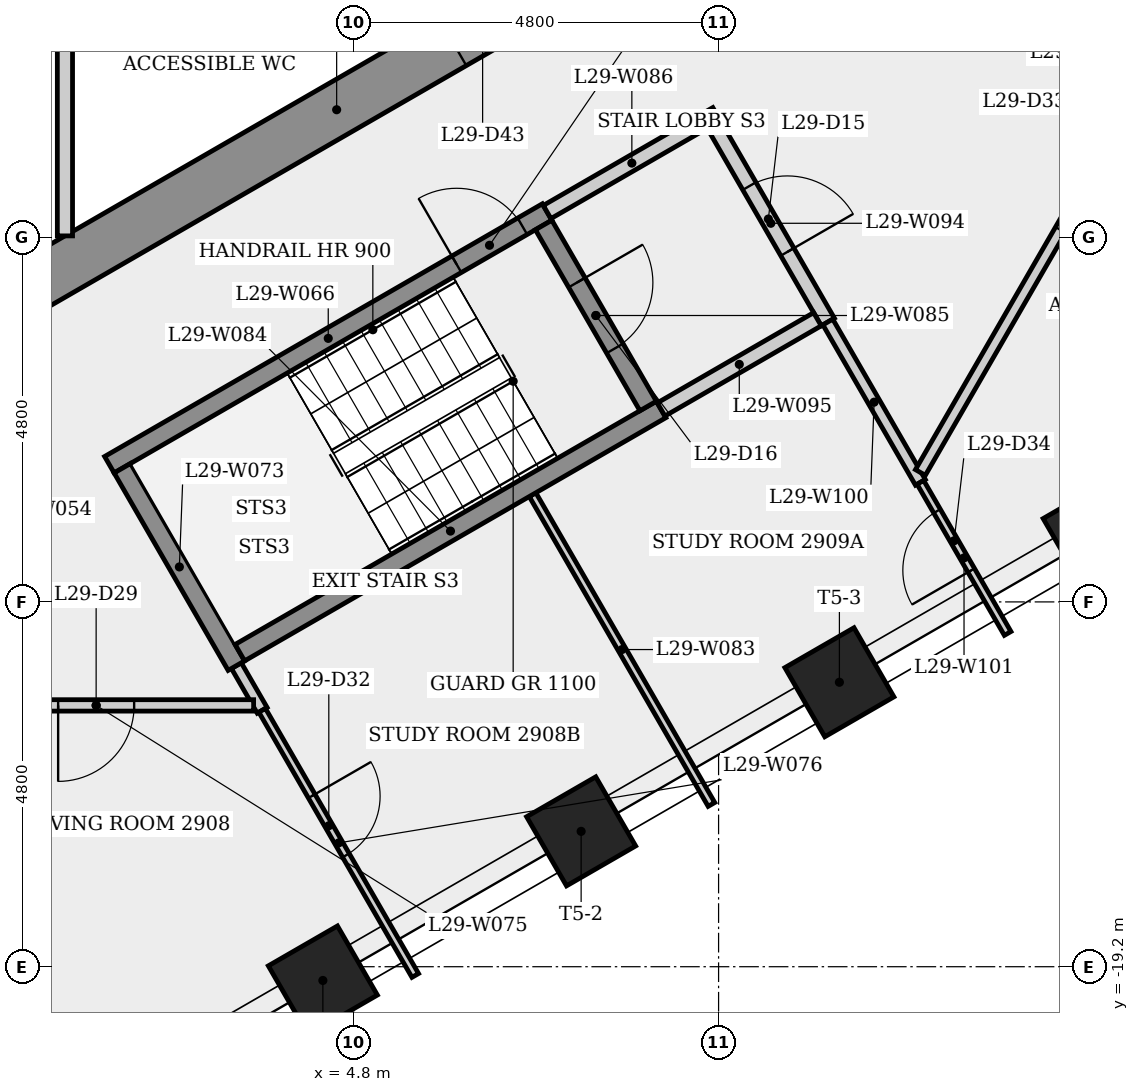
"""IFC4 building model, lengths in metres.
Left out: names, types, materials, properties, quantities, classifications, styles, units other than length and angle.
Written with IfcOpenShell. Run it as: python <this file> out.ifc"""

import sys

from ifc_helpers import new_model, si_unit, direction, frame, frame_2d, origin, origin_2d, place, context, subcontext, project, spatial, rectangle, extrude, element, fill, save


model = new_model("IFC4")
c1 = context("Model", 3, precision=1e-05, world=origin(), true_north=direction((0.0, 1.0)))
c2 = subcontext(c1, "Body", "Model", "MODEL_VIEW")
j1 = project(units=[si_unit("LENGTHUNIT", "METRE"), si_unit("PLANEANGLEUNIT", "RADIAN")], contexts=[c1])
p1 = place(None, origin())
s1 = spatial("IfcSite", under=j1, at=p1, CompositionType="ELEMENT")
p2 = place(p1, origin())
s2 = spatial("IfcBuilding", under=s1, at=p2, CompositionType="ELEMENT")
p3 = place(p2, frame((0.0, 0.0, 110.3)))
s3 = spatial("IfcBuildingStorey", under=s2, at=p3, CompositionType="ELEMENT", Elevation=110.3)
p4 = place(p3, frame((-0.175, -10.667, 0.0), z_axis=(0.0, 0.0, 1.0), x_axis=(0.866023993627, 0.500002442456, 0.0)))
e1 = element("IfcWall", 1, at=p4, inside=s3, PredefinedType="SHEAR", context=c2, shape_type="SweptSolid", body=[
    extrude(rectangle(XDim=10.97, YDim=0.7, at=frame_2d((5.485, 0.0))), origin(), (0.0, 0.0, 1.0), 3.4),
])
p5 = place(p4, frame((7.252, 0.0, 0.0)))
e2 = element("IfcOpeningElement", 2, at=p5, cuts=e1, PredefinedType="OPENING", context=c2, shape_type="SweptSolid", body=[
    extrude(rectangle(XDim=0.9, YDim=2.1, at=frame_2d((0.45, 1.05))), frame((0.0, 0.36, 0.0), z_axis=(0.0, -1.0, 0.0), x_axis=(1.0, 0.0, 0.0)), (0.0, 0.0, 1.0), 0.72),
])
for number, where, z_axis, x_axis in (
    (3, (4.394, -19.381, 0.0), (0.0, 0.0, 1.0), (0.5, -0.866, 0.0)),
    (4, (7.792, -17.419, 0.0), (0.0, 0.0, 1.0), (0.5, -0.866, 0.0)),
    (5, (11.189, -15.457, 0.0), (0.0, 0.0, 1.0), (0.5, -0.866, 0.0)),
    (6, (14.588, -13.495, 0.0), (0.0, 0.0, 1.0), (0.5, -0.866, 0.0)),
):
    element("IfcColumn", number, at=place(p3, frame(where, z_axis=z_axis, x_axis=x_axis)), inside=s3, PredefinedType="COLUMN", context=c2, shape_type="SweptSolid", body=[
        extrude(rectangle(XDim=1.05, YDim=1.05, at=origin_2d()), origin(), (0.0, 0.0, 1.0), 3.4),
    ])
p6 = place(p3, frame((1.0, -5.275, 0.0), z_axis=(0.0, 0.0, 1.0), x_axis=(0.0, -1.0, 0.0)))
e7 = element("IfcWall", 7, at=p6, inside=s3, PredefinedType="PARTITIONING", context=c2, shape_type="SweptSolid", body=[
    extrude(rectangle(XDim=4.309, YDim=0.2, at=frame_2d((2.155, 0.0))), origin(), (0.0, 0.0, 1.0), 3.05),
])
p7 = place(p3, frame((1.585, -12.595, 0.0), z_axis=(0.0, 0.0, 1.0), x_axis=(0.866036417653, 0.499980922934, 0.0)))
e8 = element("IfcWall", 8, at=p7, inside=s3, PredefinedType="SHEAR", context=c2, shape_type="SweptSolid", body=[
    extrude(rectangle(XDim=6.65, YDim=0.25, at=frame_2d((3.325, 0.0))), origin(), (0.0, 0.0, 1.0), 3.05),
])
p8 = place(p7, frame((5.275, 0.0, 0.0)))
e9 = element("IfcOpeningElement", 9, at=p8, cuts=e8, PredefinedType="OPENING", context=c2, shape_type="SweptSolid", body=[
    extrude(rectangle(XDim=1.0, YDim=2.1, at=frame_2d((0.5, 1.05))), frame((0.0, 0.135, 0.0), z_axis=(0.0, -1.0, 0.0), x_axis=(1.0, 0.0, 0.0)), (0.0, 0.0, 1.0), 0.27),
])
p9 = place(p3, frame((3.256, -15.239, 0.0), z_axis=(0.0, 0.0, 1.0), x_axis=(0.499930013145, -0.866065806944, 0.0)))
e10 = element("IfcWall", 10, at=p9, inside=s3, PredefinedType="PARTITIONING", context=c2, shape_type="SweptSolid", body=[
    extrude(rectangle(XDim=0.679, YDim=0.15, at=frame_2d((0.339, 0.0))), origin(), (0.0, 0.0, 1.0), 3.05),
])
p10 = place(p3, frame((3.256, -15.239, 0.0), z_axis=(0.0, 0.0, 1.0), x_axis=(-0.50002537861, 0.866010750942, 0.0)))
e11 = element("IfcWall", 11, at=p10, inside=s3, PredefinedType="SHEAR", context=c2, shape_type="SweptSolid", body=[
    extrude(rectangle(XDim=3.0, YDim=0.25, at=frame_2d((1.5, 0.0))), origin(), (0.0, 0.0, 1.0), 3.05),
])
p11 = place(p3, frame((3.482, -15.762, 0.0), z_axis=(0.0, 0.0, 1.0), x_axis=(-1.0, 0.0, 0.0)))
e12 = element("IfcWall", 12, at=p11, inside=s3, PredefinedType="PARTITIONING", context=c2, shape_type="SweptSolid", body=[
    extrude(rectangle(XDim=4.144, YDim=0.15, at=frame_2d((2.072, 0.0))), origin(), (0.0, 0.0, 1.0), 3.05),
])
p12 = place(p11, frame((1.572, 0.0, 0.0)))
e13 = element("IfcOpeningElement", 13, at=p12, cuts=e12, PredefinedType="OPENING", context=c2, shape_type="SweptSolid", body=[
    extrude(rectangle(XDim=1.0, YDim=2.1, at=frame_2d((0.5, 1.05))), frame((0.0, 0.085, 0.0), z_axis=(0.0, -1.0, 0.0), x_axis=(1.0, 0.0, 0.0)), (0.0, 0.0, 1.0), 0.17),
])
p13 = place(p3, frame((3.595, -15.827, 0.0), z_axis=(0.0, 0.0, 1.0), x_axis=(0.499991787927, -0.866030144975, 0.0)))
e14 = element("IfcWall", 14, at=p13, inside=s3, PredefinedType="PARTITIONING", context=c2, shape_type="SweptSolid", body=[
    extrude(rectangle(XDim=4.028, YDim=0.1, at=frame_2d((2.014, 0.0))), origin(), (0.0, 0.0, 1.0), 3.05),
])
p14 = place(p13, frame((1.303, 0.0, 0.0)))
e15 = element("IfcOpeningElement", 15, at=p14, cuts=e14, PredefinedType="OPENING", context=c2, shape_type="SweptSolid", body=[
    extrude(rectangle(XDim=0.9, YDim=2.1, at=frame_2d((0.45, 1.05))), frame((0.0, 0.06, 0.0), z_axis=(0.0, -1.0, 0.0), x_axis=(1.0, 0.0, 0.0)), (0.0, 0.0, 1.0), 0.12),
])
p15 = place(p3, frame((7.153, -12.989, 0.0), z_axis=(0.0, 0.0, 1.0), x_axis=(0.500021781351, -0.86601282795, 0.0)))
e16 = element("IfcWall", 16, at=p15, inside=s3, PredefinedType="PARTITIONING", context=c2, shape_type="SweptSolid", body=[
    extrude(rectangle(XDim=4.707, YDim=0.1, at=frame_2d((2.354, 0.0))), origin(), (0.0, 0.0, 1.0), 3.05),
])
p16 = place(p3, frame((3.301, -15.068, 0.0), z_axis=(0.0, 0.0, 1.0), x_axis=(0.866035036182, 0.499983315828, 0.0)))
e17 = element("IfcWall", 17, at=p16, inside=s3, PredefinedType="SHEAR", context=c2, shape_type="SweptSolid", body=[
    extrude(rectangle(XDim=6.4, YDim=0.25, at=frame_2d((3.2, 0.0))), origin(), (0.0, 0.0, 1.0), 3.05),
])
p17 = place(p3, frame((7.298, -9.441, 0.0), z_axis=(0.0, 0.0, 1.0), x_axis=(0.500034990121, -0.866005201286, 0.0)))
e18 = element("IfcWall", 18, at=p17, inside=s3, PredefinedType="SHEAR", context=c2, shape_type="SweptSolid", body=[
    extrude(rectangle(XDim=2.75, YDim=0.25, at=frame_2d((1.375, 0.0))), origin(), (0.0, 0.0, 1.0), 3.05),
])
p18 = place(p17, frame((0.875, 0.0, 0.0)))
e19 = element("IfcOpeningElement", 19, at=p18, cuts=e18, PredefinedType="OPENING", context=c2, shape_type="SweptSolid", body=[
    extrude(rectangle(XDim=1.0, YDim=2.1, at=frame_2d((0.5, 1.05))), frame((0.0, 0.135, 0.0), z_axis=(0.0, -1.0, 0.0), x_axis=(1.0, 0.0, 0.0)), (0.0, 0.0, 1.0), 0.27),
])
p19 = place(p3, frame((7.344, -9.27, 0.0), z_axis=(0.0, 0.0, 1.0), x_axis=(0.866005588531, 0.500034319456, 0.0)))
e20 = element("IfcWall", 20, at=p19, inside=s3, PredefinedType="PARTITIONING", context=c2, shape_type="SweptSolid", body=[
    extrude(rectangle(XDim=2.575, YDim=0.2, at=frame_2d((1.288, 0.0))), origin(), (0.0, 0.0, 1.0), 3.05),
])
p20 = place(p3, frame((9.537, -8.119, 0.0), z_axis=(0.0, 0.0, 1.0), x_axis=(0.499990139034, -0.866031096941, 0.0)))
e21 = element("IfcWall", 21, at=p20, inside=s3, PredefinedType="PARTITIONING", context=c2, shape_type="SweptSolid", body=[
    extrude(rectangle(XDim=3.0, YDim=0.2, at=frame_2d((1.5, 0.0))), origin(), (0.0, 0.0, 1.0), 3.05),
])
p21 = place(p20, frame((0.935, 0.0, 0.0)))
e22 = element("IfcOpeningElement", 22, at=p21, cuts=e21, PredefinedType="OPENING", context=c2, shape_type="SweptSolid", body=[
    extrude(rectangle(XDim=1.0, YDim=2.1, at=frame_2d((0.5, 1.05))), frame((0.0, 0.11, 0.0), z_axis=(0.0, -1.0, 0.0), x_axis=(1.0, 0.0, 0.0)), (0.0, 0.0, 1.0), 0.22),
])
p22 = place(p3, frame((10.901, -10.681, 0.0), z_axis=(0.0, 0.0, 1.0), x_axis=(-0.866007538022, -0.500030943131, 0.0)))
e23 = element("IfcWall", 23, at=p22, inside=s3, PredefinedType="PARTITIONING", context=c2, shape_type="SweptSolid", body=[
    extrude(rectangle(XDim=2.375, YDim=0.2, at=frame_2d((1.188, 0.0))), origin(), (0.0, 0.0, 1.0), 3.05),
])
p23 = place(p3, frame((12.255, -12.827, 0.0), z_axis=(0.0, 0.0, 1.0), x_axis=(-0.500008743658, 0.866020355572, 0.0)))
e24 = element("IfcWall", 24, at=p23, inside=s3, PredefinedType="PARTITIONING", context=c2, shape_type="SweptSolid", body=[
    extrude(rectangle(XDim=2.436, YDim=0.15, at=frame_2d((1.218, 0.0))), origin(), (0.0, 0.0, 1.0), 3.05),
])
p24 = place(p3, frame((13.403, -14.815, 0.0), z_axis=(0.0, 0.0, 1.0), x_axis=(-0.500004737999, 0.866022668282, 0.0)))
e25 = element("IfcWall", 25, at=p24, inside=s3, PredefinedType="PARTITIONING", context=c2, shape_type="SweptSolid", body=[
    extrude(rectangle(XDim=2.296, YDim=0.1, at=frame_2d((1.148, 0.0))), origin(), (0.0, 0.0, 1.0), 3.05),
])
p25 = place(p24, frame((0.958, 0.0, 0.0)))
e26 = element("IfcOpeningElement", 26, at=p25, cuts=e25, PredefinedType="OPENING", context=c2, shape_type="SweptSolid", body=[
    extrude(rectangle(XDim=0.9, YDim=2.1, at=frame_2d((0.45, 1.05))), frame((0.0, 0.06, 0.0), z_axis=(0.0, -1.0, 0.0), x_axis=(1.0, 0.0, 0.0)), (0.0, 0.0, 1.0), 0.12),
])
p26 = place(p3, frame((16.441, -5.447, 0.0), z_axis=(0.0, 0.0, 1.0), x_axis=(-0.500000140117, -0.866025322888, 0.0)))
e27 = element("IfcWall", 27, at=p26, inside=s3, PredefinedType="PARTITIONING", context=c2, shape_type="SweptSolid", body=[
    extrude(rectangle(XDim=8.372, YDim=0.15, at=frame_2d((4.186, 0.0))), origin(), (0.0, 0.0, 1.0), 3.05),
])
p27 = place(p26, frame((3.686, 0.0, 0.0)))
e28 = element("IfcOpeningElement", 28, at=p27, cuts=e27, PredefinedType="OPENING", context=c2, shape_type="SweptSolid", body=[
    extrude(rectangle(XDim=1.0, YDim=2.1, at=frame_2d((0.5, 1.05))), frame((0.0, 0.085, 0.0), z_axis=(0.0, -1.0, 0.0), x_axis=(1.0, 0.0, 0.0)), (0.0, 0.0, 1.0), 0.17),
])
p28 = place(p8, origin())
e29 = element("IfcDoor", 29, at=p28, inside=s3, OperationType="SINGLE_SWING_LEFT", PredefinedType="DOOR", context=c2, shape_type="SweptSolid", body=[
    extrude(rectangle(XDim=1.0, YDim=2.1, at=frame_2d((0.5, 1.05))), frame((0.0, 0.025, 0.0), z_axis=(0.0, -1.0, 0.0), x_axis=(1.0, 0.0, 0.0)), (0.0, 0.0, 1.0), 0.05),
])
fill(e9, e29)
p29 = place(p21, origin())
e30 = element("IfcDoor", 30, at=p29, inside=s3, OperationType="SINGLE_SWING_RIGHT", PredefinedType="DOOR", context=c2, shape_type="SweptSolid", body=[
    extrude(rectangle(XDim=1.0, YDim=2.1, at=frame_2d((0.5, 1.05))), frame((0.0, 0.025, 0.0), z_axis=(0.0, -1.0, 0.0), x_axis=(1.0, 0.0, 0.0)), (0.0, 0.0, 1.0), 0.05),
])
fill(e22, e30)
p30 = place(p18, origin())
e31 = element("IfcDoor", 31, at=p30, inside=s3, OperationType="SINGLE_SWING_LEFT", PredefinedType="DOOR", context=c2, shape_type="SweptSolid", body=[
    extrude(rectangle(XDim=1.0, YDim=2.1, at=frame_2d((0.5, 1.05))), frame((0.0, 0.025, 0.0), z_axis=(0.0, -1.0, 0.0), x_axis=(1.0, 0.0, 0.0)), (0.0, 0.0, 1.0), 0.05),
])
fill(e19, e31)
p31 = place(p12, origin())
e32 = element("IfcDoor", 32, at=p31, inside=s3, OperationType="SINGLE_SWING_RIGHT", PredefinedType="DOOR", context=c2, shape_type="SweptSolid", body=[
    extrude(rectangle(XDim=1.0, YDim=2.1, at=frame_2d((0.5, 1.05))), frame((0.0, 0.025, 0.0), z_axis=(0.0, -1.0, 0.0), x_axis=(1.0, 0.0, 0.0)), (0.0, 0.0, 1.0), 0.05),
])
fill(e13, e32)
p32 = place(p14, origin())
e33 = element("IfcDoor", 33, at=p32, inside=s3, OperationType="SINGLE_SWING_LEFT", PredefinedType="DOOR", context=c2, shape_type="SweptSolid", body=[
    extrude(rectangle(XDim=0.9, YDim=2.1, at=frame_2d((0.45, 1.05))), frame((0.0, 0.025, 0.0), z_axis=(0.0, -1.0, 0.0), x_axis=(1.0, 0.0, 0.0)), (0.0, 0.0, 1.0), 0.05),
])
fill(e15, e33)
p33 = place(p25, origin())
e34 = element("IfcDoor", 34, at=p33, inside=s3, OperationType="SINGLE_SWING_LEFT", PredefinedType="DOOR", context=c2, shape_type="SweptSolid", body=[
    extrude(rectangle(XDim=0.9, YDim=2.1, at=frame_2d((0.45, 1.05))), frame((0.0, 0.025, 0.0), z_axis=(0.0, -1.0, 0.0), x_axis=(1.0, 0.0, 0.0)), (0.0, 0.0, 1.0), 0.05),
])
fill(e26, e34)
save(model, sys.argv[1])
